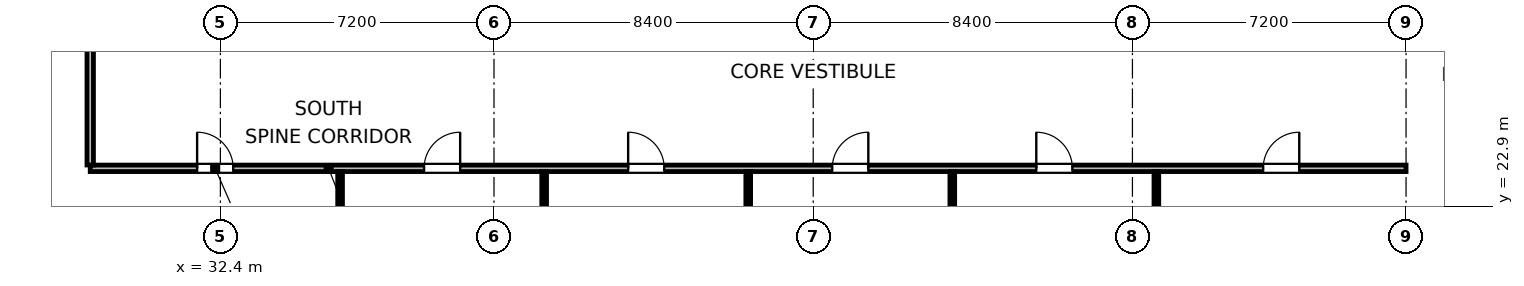
"""IFC4 building model, lengths in metres.
Left out: names, types, materials, properties, quantities, classifications, styles, units other than length and angle.
Written with IfcOpenShell. Run it as: python <this file> out.ifc"""

import sys

from ifc_helpers import new_model, si_unit, direction, frame, frame_2d, origin, place, context, subcontext, project, spatial, rectangle, extrude, element, fill, save


model = new_model("IFC4")
c1 = context("Model", 3, precision=1e-05, world=origin(), true_north=direction((0.0, 1.0)))
c2 = subcontext(c1, "Body", "Model", "MODEL_VIEW")
j1 = project(units=[si_unit("LENGTHUNIT", "METRE"), si_unit("PLANEANGLEUNIT", "RADIAN")], contexts=[c1])
p1 = place(None, origin())
s1 = spatial("IfcSite", under=j1, at=p1, CompositionType="ELEMENT")
p2 = place(p1, origin())
s2 = spatial("IfcBuilding", under=s1, at=p2, CompositionType="ELEMENT")
p3 = place(p2, frame((0.0, 0.0, 125.4)))
s3 = spatial("IfcBuildingStorey", under=s2, at=p3, CompositionType="ELEMENT", Elevation=125.4)
p4 = place(p3, frame((28.975, 23.9, 0.0), z_axis=(0.0, 0.0, 1.0), x_axis=(1.0, 0.0, 0.0)))
e1 = element("IfcWall", 1, at=p4, inside=s3, PredefinedType="PARTITIONING", context=c2, shape_type="SweptSolid", body=[
    extrude(rectangle(XDim=34.625, YDim=0.17, at=frame_2d((17.312, 0.0))), origin(), (0.0, 0.0, 1.0), 4.24),
])
p5 = place(p4, frame((2.813, 0.0, 0.0)))
e2 = element("IfcOpeningElement", 2, at=p5, cuts=e1, PredefinedType="OPENING", context=c2, shape_type="SweptSolid", body=[
    extrude(rectangle(XDim=0.95, YDim=2.04, at=frame_2d((0.475, 1.02))), frame((0.0, 0.095, 0.0), z_axis=(0.0, -1.0, 0.0), x_axis=(1.0, 0.0, 0.0)), (0.0, 0.0, 1.0), 0.19),
])
p6 = place(p4, frame((8.785, 0.0, 0.0)))
e3 = element("IfcOpeningElement", 3, at=p6, cuts=e1, PredefinedType="OPENING", context=c2, shape_type="SweptSolid", body=[
    extrude(rectangle(XDim=0.95, YDim=2.04, at=frame_2d((0.475, 1.02))), frame((0.0, 0.095, 0.0), z_axis=(0.0, -1.0, 0.0), x_axis=(1.0, 0.0, 0.0)), (0.0, 0.0, 1.0), 0.19),
])
p7 = place(p4, frame((14.155, 0.0, 0.0)))
e4 = element("IfcOpeningElement", 4, at=p7, cuts=e1, PredefinedType="OPENING", context=c2, shape_type="SweptSolid", body=[
    extrude(rectangle(XDim=0.95, YDim=2.04, at=frame_2d((0.475, 1.02))), frame((0.0, 0.095, 0.0), z_axis=(0.0, -1.0, 0.0), x_axis=(1.0, 0.0, 0.0)), (0.0, 0.0, 1.0), 0.19),
])
p8 = place(p4, frame((19.525, 0.0, 0.0)))
e5 = element("IfcOpeningElement", 5, at=p8, cuts=e1, PredefinedType="OPENING", context=c2, shape_type="SweptSolid", body=[
    extrude(rectangle(XDim=0.95, YDim=2.04, at=frame_2d((0.475, 1.02))), frame((0.0, 0.095, 0.0), z_axis=(0.0, -1.0, 0.0), x_axis=(1.0, 0.0, 0.0)), (0.0, 0.0, 1.0), 0.19),
])
p9 = place(p4, frame((24.895, 0.0, 0.0)))
e6 = element("IfcOpeningElement", 6, at=p9, cuts=e1, PredefinedType="OPENING", context=c2, shape_type="SweptSolid", body=[
    extrude(rectangle(XDim=0.95, YDim=2.04, at=frame_2d((0.475, 1.02))), frame((0.0, 0.095, 0.0), z_axis=(0.0, -1.0, 0.0), x_axis=(1.0, 0.0, 0.0)), (0.0, 0.0, 1.0), 0.19),
])
p10 = place(p4, frame((30.865, 0.0, 0.0)))
e7 = element("IfcOpeningElement", 7, at=p10, cuts=e1, PredefinedType="OPENING", context=c2, shape_type="SweptSolid", body=[
    extrude(rectangle(XDim=0.95, YDim=2.04, at=frame_2d((0.475, 1.02))), frame((0.0, 0.095, 0.0), z_axis=(0.0, -1.0, 0.0), x_axis=(1.0, 0.0, 0.0)), (0.0, 0.0, 1.0), 0.19),
])
p11 = place(p3, frame((28.975, 23.987, 0.0), z_axis=(0.0, 0.0, 1.0), x_axis=(0.0, 1.0, 0.0)))
e8 = element("IfcWall", 8, at=p11, inside=s3, PredefinedType="PARTITIONING", context=c2, shape_type="SweptSolid", body=[
    extrude(rectangle(XDim=10.413, YDim=0.17, at=frame_2d((5.207, 0.0))), origin(), (0.0, 0.0, 1.0), 4.24),
])
p12 = place(p11, frame((4.688, 0.0, 0.0)))
e9 = element("IfcOpeningElement", 9, at=p12, cuts=e8, PredefinedType="OPENING", context=c2, shape_type="SweptSolid", body=[
    extrude(rectangle(XDim=0.95, YDim=2.04, at=frame_2d((0.475, 1.02))), frame((0.0, 0.095, 0.0), z_axis=(0.0, -1.0, 0.0), x_axis=(1.0, 0.0, 0.0)), (0.0, 0.0, 1.0), 0.19),
])
p13 = place(p3, frame((35.55, 9.915, 0.0), z_axis=(0.0, 0.0, 1.0), x_axis=(0.0, 1.0, 0.0)))
e10 = element("IfcWall", 10, at=p13, inside=s3, PredefinedType="PARTITIONING", context=c2, shape_type="SweptSolid", body=[
    extrude(rectangle(XDim=13.898, YDim=0.125, at=frame_2d((6.949, 0.0))), origin(), (0.0, 0.0, 1.0), 4.24),
])
p14 = place(p3, frame((40.92, 9.915, 0.0), z_axis=(0.0, 0.0, 1.0), x_axis=(0.0, 1.0, 0.0)))
e11 = element("IfcWall", 11, at=p14, inside=s3, PredefinedType="PARTITIONING", context=c2, shape_type="SweptSolid", body=[
    extrude(rectangle(XDim=13.898, YDim=0.125, at=frame_2d((6.949, 0.0))), origin(), (0.0, 0.0, 1.0), 3.603),
])
p15 = place(p3, frame((46.29, 13.575, 0.0), z_axis=(0.0, 0.0, 1.0), x_axis=(0.0, 1.0, 0.0)))
e12 = element("IfcWall", 12, at=p15, inside=s3, PredefinedType="PARTITIONING", context=c2, shape_type="SweptSolid", body=[
    extrude(rectangle(XDim=10.238, YDim=0.125, at=frame_2d((5.119, 0.0))), origin(), (0.0, 0.0, 1.0), 4.24),
])
p16 = place(p3, frame((51.66, 11.515, 0.0), z_axis=(0.0, 0.0, 1.0), x_axis=(0.0, 1.0, 0.0)))
e13 = element("IfcWall", 13, at=p16, inside=s3, PredefinedType="PARTITIONING", context=c2, shape_type="SweptSolid", body=[
    extrude(rectangle(XDim=12.298, YDim=0.125, at=frame_2d((6.149, 0.0))), origin(), (0.0, 0.0, 1.0), 3.603),
])
p17 = place(p3, frame((57.03, 9.915, 0.0), z_axis=(0.0, 0.0, 1.0), x_axis=(0.0, 1.0, 0.0)))
e14 = element("IfcWall", 14, at=p17, inside=s3, PredefinedType="PARTITIONING", context=c2, shape_type="SweptSolid", body=[
    extrude(rectangle(XDim=13.898, YDim=0.125, at=frame_2d((6.949, 0.0))), origin(), (0.0, 0.0, 1.0), 4.24),
])
p18 = place(p5, origin())
e15 = element("IfcDoor", 15, at=p18, inside=s3, OperationType="SINGLE_SWING_LEFT", PredefinedType="DOOR", context=c2, shape_type="SweptSolid", body=[
    extrude(rectangle(XDim=0.95, YDim=2.04, at=frame_2d((0.475, 1.02))), frame((0.0, 0.025, 0.0), z_axis=(0.0, -1.0, 0.0), x_axis=(1.0, 0.0, 0.0)), (0.0, 0.0, 1.0), 0.05),
])
fill(e2, e15)
p19 = place(p6, origin())
e16 = element("IfcDoor", 16, at=p19, inside=s3, OperationType="SINGLE_SWING_RIGHT", PredefinedType="DOOR", context=c2, shape_type="SweptSolid", body=[
    extrude(rectangle(XDim=0.95, YDim=2.04, at=frame_2d((0.475, 1.02))), frame((0.0, 0.025, 0.0), z_axis=(0.0, -1.0, 0.0), x_axis=(1.0, 0.0, 0.0)), (0.0, 0.0, 1.0), 0.05),
])
fill(e3, e16)
p20 = place(p7, origin())
e17 = element("IfcDoor", 17, at=p20, inside=s3, OperationType="SINGLE_SWING_LEFT", PredefinedType="DOOR", context=c2, shape_type="SweptSolid", body=[
    extrude(rectangle(XDim=0.95, YDim=2.04, at=frame_2d((0.475, 1.02))), frame((0.0, 0.025, 0.0), z_axis=(0.0, -1.0, 0.0), x_axis=(1.0, 0.0, 0.0)), (0.0, 0.0, 1.0), 0.05),
])
fill(e4, e17)
p21 = place(p8, origin())
e18 = element("IfcDoor", 18, at=p21, inside=s3, OperationType="SINGLE_SWING_RIGHT", PredefinedType="DOOR", context=c2, shape_type="SweptSolid", body=[
    extrude(rectangle(XDim=0.95, YDim=2.04, at=frame_2d((0.475, 1.02))), frame((0.0, 0.025, 0.0), z_axis=(0.0, -1.0, 0.0), x_axis=(1.0, 0.0, 0.0)), (0.0, 0.0, 1.0), 0.05),
])
fill(e5, e18)
p22 = place(p9, origin())
e19 = element("IfcDoor", 19, at=p22, inside=s3, OperationType="SINGLE_SWING_LEFT", PredefinedType="DOOR", context=c2, shape_type="SweptSolid", body=[
    extrude(rectangle(XDim=0.95, YDim=2.04, at=frame_2d((0.475, 1.02))), frame((0.0, 0.025, 0.0), z_axis=(0.0, -1.0, 0.0), x_axis=(1.0, 0.0, 0.0)), (0.0, 0.0, 1.0), 0.05),
])
fill(e6, e19)
p23 = place(p10, origin())
e20 = element("IfcDoor", 20, at=p23, inside=s3, OperationType="SINGLE_SWING_RIGHT", PredefinedType="DOOR", context=c2, shape_type="SweptSolid", body=[
    extrude(rectangle(XDim=0.95, YDim=2.04, at=frame_2d((0.475, 1.02))), frame((0.0, 0.025, 0.0), z_axis=(0.0, -1.0, 0.0), x_axis=(1.0, 0.0, 0.0)), (0.0, 0.0, 1.0), 0.05),
])
fill(e7, e20)
save(model, sys.argv[1])
